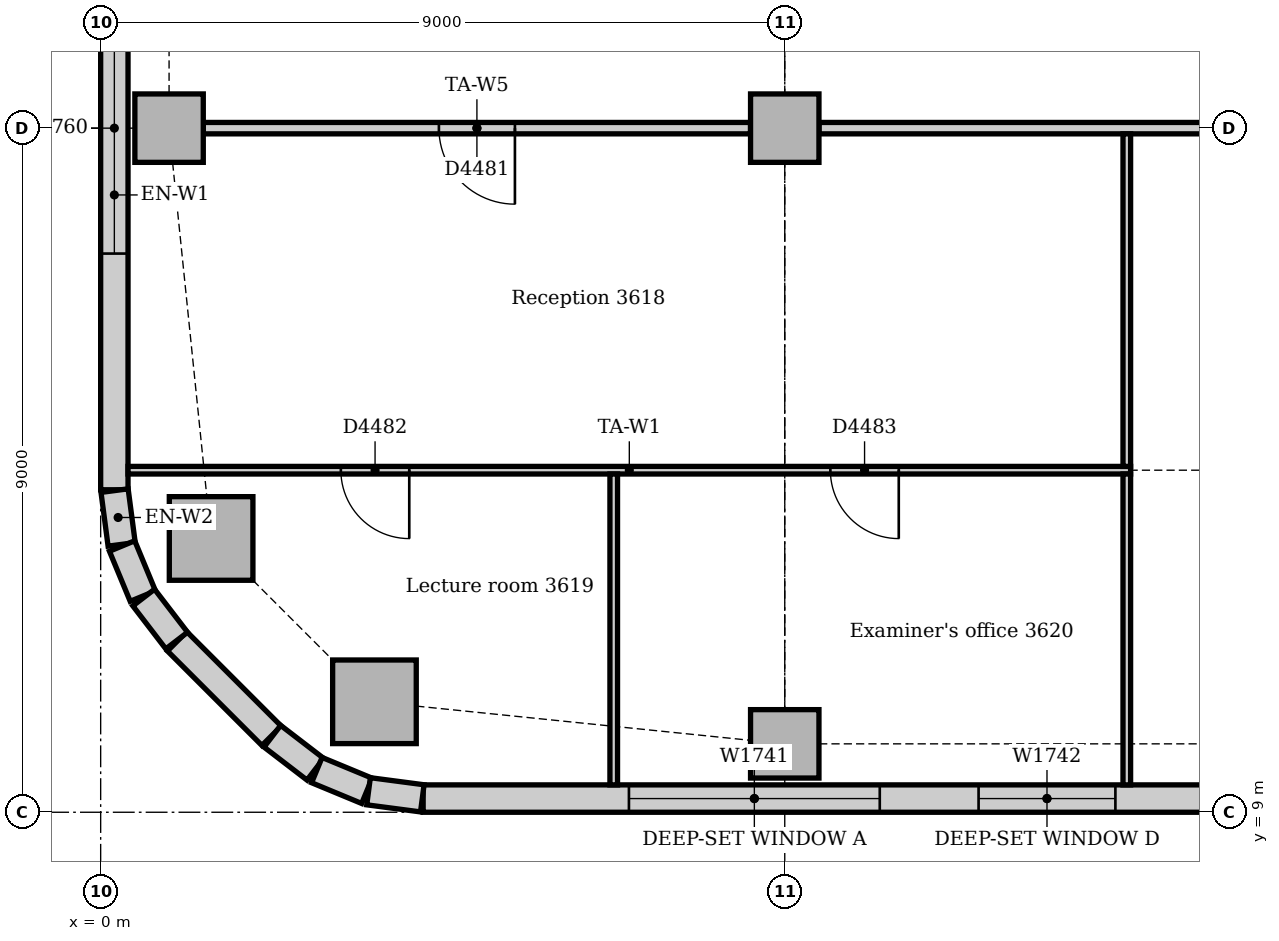
"""IFC4 building model, lengths in metres.
Left out: names, types, materials, properties, quantities, classifications, styles, units other than length and angle.
Written with IfcOpenShell. Run it as: python <this file> out.ifc"""

import sys

from ifc_helpers import new_model, si_unit, direction, frame, frame_2d, origin, origin_2d, place, context, subcontext, project, spatial, rectangle, extrude, element, fill, save


model = new_model("IFC4")
c1 = context("Model", 3, precision=1e-05, world=origin(), true_north=direction((0.0, 1.0)))
c2 = subcontext(c1, "Body", "Model", "MODEL_VIEW")
j1 = project(units=[si_unit("LENGTHUNIT", "METRE"), si_unit("PLANEANGLEUNIT", "RADIAN")], contexts=[c1])
p1 = place(None, origin())
s1 = spatial("IfcSite", under=j1, at=p1, CompositionType="ELEMENT")
p2 = place(p1, origin())
s2 = spatial("IfcBuilding", under=s1, at=p2, CompositionType="ELEMENT")
p3 = place(p2, frame((0.0, 0.0, 153.0)))
s3 = spatial("IfcBuildingStorey", under=s2, at=p3, CompositionType="ELEMENT", Elevation=153.0)
for number, where, z_axis, x_axis in (
    (1, (3.602, 10.453, 0.0), (0.0, 0.0, 1.0), (1.0, 0.0, 0.0)),
    (2, (1.453, 12.602, 0.0), (0.0, 0.0, 1.0), (1.0, 0.0, 0.0)),
):
    element("IfcColumn", number, at=place(p3, frame(where, z_axis=z_axis, x_axis=x_axis)), inside=s3, PredefinedType="COLUMN", context=c2, shape_type="SweptSolid", body=[
        extrude(rectangle(XDim=1.1, YDim=1.1, at=origin_2d()), origin(), (0.0, 0.0, 1.0), 3.85),
    ])
for number, where, z_axis, x_axis in (
    (3, (9.0, 9.9, 0.0), (0.0, 0.0, 1.0), (1.0, 0.0, 0.0)),
    (4, (0.9, 18.0, 0.0), (0.0, 0.0, 1.0), (1.0, 0.0, 0.0)),
    (5, (9.0, 18.0, 0.0), (0.0, 0.0, 1.0), (1.0, 0.0, 0.0)),
):
    element("IfcColumn", number, at=place(p3, frame(where, z_axis=z_axis, x_axis=x_axis)), inside=s3, PredefinedType="COLUMN", context=c2, shape_type="SweptSolid", body=[
        extrude(rectangle(XDim=0.9, YDim=0.9, at=origin_2d()), origin(), (0.0, 0.0, 1.0), 3.85),
    ])
p4 = place(p3, frame((4.243, 9.18, 0.0), z_axis=(0.0, 0.0, 1.0), x_axis=(1.0, 0.0, 0.0)))
e6 = element("IfcWall", 6, at=p4, inside=s3, PredefinedType="STANDARD", context=c2, shape_type="SweptSolid", body=[
    extrude(rectangle(XDim=30.515, YDim=0.36, at=frame_2d((15.257, 0.0))), origin(), (0.0, 0.0, 1.0), 3.85),
])
p5 = place(p4, frame((2.707, 0.0, 0.9)))
e7 = element("IfcOpeningElement", 7, at=p5, cuts=e6, PredefinedType="OPENING", context=c2, shape_type="SweptSolid", body=[
    extrude(rectangle(XDim=3.3, YDim=1.6, at=frame_2d((1.65, 0.8))), frame((0.0, 0.19, 0.0), z_axis=(0.0, -1.0, 0.0), x_axis=(1.0, 0.0, 0.0)), (0.0, 0.0, 1.0), 0.38),
])
p6 = place(p4, frame((7.307, 0.0, 0.9)))
e8 = element("IfcOpeningElement", 8, at=p6, cuts=e6, PredefinedType="OPENING", context=c2, shape_type="SweptSolid", body=[
    extrude(rectangle(XDim=1.8, YDim=1.6, at=frame_2d((0.9, 0.8))), frame((0.0, 0.19, 0.0), z_axis=(0.0, -1.0, 0.0), x_axis=(1.0, 0.0, 0.0)), (0.0, 0.0, 1.0), 0.38),
])
p7 = place(p4, frame((11.357, 0.0, 0.9)))
e9 = element("IfcOpeningElement", 9, at=p7, cuts=e6, PredefinedType="OPENING", context=c2, shape_type="SweptSolid", body=[
    extrude(rectangle(XDim=3.3, YDim=1.6, at=frame_2d((1.65, 0.8))), frame((0.0, 0.19, 0.0), z_axis=(0.0, -1.0, 0.0), x_axis=(1.0, 0.0, 0.0)), (0.0, 0.0, 1.0), 0.38),
])
p8 = place(p4, frame((16.307, 0.0, 0.9)))
e10 = element("IfcOpeningElement", 10, at=p8, cuts=e6, PredefinedType="OPENING", context=c2, shape_type="SweptSolid", body=[
    extrude(rectangle(XDim=1.8, YDim=1.6, at=frame_2d((0.9, 0.8))), frame((0.0, 0.19, 0.0), z_axis=(0.0, -1.0, 0.0), x_axis=(1.0, 0.0, 0.0)), (0.0, 0.0, 1.0), 0.38),
])
p9 = place(p4, frame((20.357, 0.0, 0.9)))
e11 = element("IfcOpeningElement", 11, at=p9, cuts=e6, PredefinedType="OPENING", context=c2, shape_type="SweptSolid", body=[
    extrude(rectangle(XDim=3.3, YDim=1.6, at=frame_2d((1.65, 0.8))), frame((0.0, 0.19, 0.0), z_axis=(0.0, -1.0, 0.0), x_axis=(1.0, 0.0, 0.0)), (0.0, 0.0, 1.0), 0.38),
])
p10 = place(p4, frame((25.207, 0.0, 0.9)))
e12 = element("IfcOpeningElement", 12, at=p10, cuts=e6, PredefinedType="OPENING", context=c2, shape_type="SweptSolid", body=[
    extrude(rectangle(XDim=3.3, YDim=1.6, at=frame_2d((1.65, 0.8))), frame((0.0, 0.19, 0.0), z_axis=(0.0, -1.0, 0.0), x_axis=(1.0, 0.0, 0.0)), (0.0, 0.0, 1.0), 0.38),
])
p11 = place(p3, frame((0.18, 21.0, 0.0), z_axis=(0.0, 0.0, 1.0), x_axis=(0.0, -1.0, 0.0)))
e13 = element("IfcWall", 13, at=p11, inside=s3, PredefinedType="STANDARD", context=c2, shape_type="SweptSolid", body=[
    extrude(rectangle(XDim=7.757, YDim=0.36, at=frame_2d((3.879, 0.0))), origin(), (0.0, 0.0, 1.0), 3.85),
])
p12 = place(p11, frame((1.35, 0.0, 0.9)))
e14 = element("IfcOpeningElement", 14, at=p12, cuts=e13, PredefinedType="OPENING", context=c2, shape_type="SweptSolid", body=[
    extrude(rectangle(XDim=3.3, YDim=1.6, at=frame_2d((1.65, 0.8))), frame((0.0, 0.19, 0.0), z_axis=(0.0, -1.0, 0.0), x_axis=(1.0, 0.0, 0.0)), (0.0, 0.0, 1.0), 0.38),
])
p13 = place(p3, frame((1.006, 11.249, 0.0), z_axis=(0.0, 0.0, 1.0), x_axis=(0.707106781187, -0.707106781187, 0.0)))
e15 = element("IfcWall", 15, at=p13, inside=s3, PredefinedType="STANDARD", context=c2, shape_type="SweptSolid", body=[
    extrude(rectangle(XDim=1.757, YDim=0.36, at=frame_2d((0.879, 0.0))), origin(), (0.0, 0.0, 1.0), 3.85),
])
for number, where, z_axis, x_axis in (
    (16, (0.183, 13.231, 0.0), (0.0, 0.0, 1.0), (0.131, -0.991, 0.0)),
    (17, (0.282, 12.503, 0.0), (0.0, 0.0, 1.0), (0.383, -0.924, 0.0)),
):
    element("IfcWall", number, at=place(p3, frame(where, z_axis=z_axis, x_axis=x_axis)), inside=s3, PredefinedType="STANDARD", context=c2, shape_type="SweptSolid", body=[
        extrude(rectangle(XDim=0.713, YDim=0.36, at=frame_2d((0.356, 0.0))), origin(), (0.0, 0.0, 1.0), 3.85),
    ])
for number, where, z_axis, x_axis in (
    (18, (0.566, 11.825, 0.0), (0.0, 0.0, 1.0), (0.609, -0.793, 0.0)),
    (19, (2.259, 10.0, 0.0), (0.0, 0.0, 1.0), (0.793, -0.609, 0.0)),
):
    element("IfcWall", number, at=place(p3, frame(where, z_axis=z_axis, x_axis=x_axis)), inside=s3, PredefinedType="STANDARD", context=c2, shape_type="SweptSolid", body=[
        extrude(rectangle(XDim=0.713, YDim=0.36, at=frame_2d((0.357, 0.0))), origin(), (0.0, 0.0, 1.0), 3.85),
    ])
for number, where, z_axis, x_axis in (
    (20, (2.844, 9.555, 0.0), (0.0, 0.0, 1.0), (0.924, -0.383, 0.0)),
    (21, (3.524, 9.276, 0.0), (0.0, 0.0, 1.0), (0.991, -0.131, 0.0)),
):
    element("IfcWall", number, at=place(p3, frame(where, z_axis=z_axis, x_axis=x_axis)), inside=s3, PredefinedType="STANDARD", context=c2, shape_type="SweptSolid", body=[
        extrude(rectangle(XDim=0.713, YDim=0.36, at=frame_2d((0.356, 0.0))), origin(), (0.0, 0.0, 1.0), 3.85),
    ])
p14 = place(p3, frame((1.35, 18.0, 0.0), z_axis=(0.0, 0.0, 1.0), x_axis=(1.0, 0.0, 0.0)))
e22 = element("IfcWall", 22, at=p14, inside=s3, PredefinedType="PARTITIONING", context=c2, shape_type="SweptSolid", body=[
    extrude(rectangle(XDim=7.2, YDim=0.15, at=frame_2d((3.6, 0.0))), origin(), (0.0, 0.0, 1.0), 3.262),
])
p15 = place(p14, frame((3.1, 0.0, 0.0)))
e23 = element("IfcOpeningElement", 23, at=p15, cuts=e22, PredefinedType="OPENING", context=c2, shape_type="SweptSolid", body=[
    extrude(rectangle(XDim=1.0, YDim=2.1, at=frame_2d((0.5, 1.05))), frame((0.0, 0.085, 0.0), z_axis=(0.0, -1.0, 0.0), x_axis=(1.0, 0.0, 0.0)), (0.0, 0.0, 1.0), 0.17),
])
p16 = place(p3, frame((9.45, 18.0, 0.0), z_axis=(0.0, 0.0, 1.0), x_axis=(1.0, 0.0, 0.0)))
e24 = element("IfcWall", 24, at=p16, inside=s3, PredefinedType="PARTITIONING", context=c2, shape_type="SweptSolid", body=[
    extrude(rectangle(XDim=8.1, YDim=0.15, at=frame_2d((4.05, 0.0))), origin(), (0.0, 0.0, 1.0), 3.262),
])
p17 = place(p16, frame((5.55, 0.0, 0.0)))
e25 = element("IfcOpeningElement", 25, at=p17, cuts=e24, PredefinedType="OPENING", context=c2, shape_type="SweptSolid", body=[
    extrude(rectangle(XDim=0.9, YDim=2.1, at=frame_2d((0.45, 1.05))), frame((0.0, 0.085, 0.0), z_axis=(0.0, -1.0, 0.0), x_axis=(1.0, 0.0, 0.0)), (0.0, 0.0, 1.0), 0.17),
])
p18 = place(p3, frame((0.36, 13.5, 0.0), z_axis=(0.0, 0.0, 1.0), x_axis=(1.0, 0.0, 0.0)))
e26 = element("IfcWall", 26, at=p18, inside=s3, PredefinedType="PARTITIONING", context=c2, shape_type="SweptSolid", body=[
    extrude(rectangle(XDim=13.19, YDim=0.1, at=frame_2d((6.595, 0.0))), origin(), (0.0, 0.0, 1.0), 3.4),
])
p19 = place(p18, frame((2.8, 0.0, 0.0)))
e27 = element("IfcOpeningElement", 27, at=p19, cuts=e26, PredefinedType="OPENING", context=c2, shape_type="SweptSolid", body=[
    extrude(rectangle(XDim=0.9, YDim=2.1, at=frame_2d((0.45, 1.05))), frame((0.0, 0.06, 0.0), z_axis=(0.0, -1.0, 0.0), x_axis=(1.0, 0.0, 0.0)), (0.0, 0.0, 1.0), 0.12),
])
p20 = place(p18, frame((9.24, 0.0, 0.0)))
e28 = element("IfcOpeningElement", 28, at=p20, cuts=e26, PredefinedType="OPENING", context=c2, shape_type="SweptSolid", body=[
    extrude(rectangle(XDim=0.9, YDim=2.1, at=frame_2d((0.45, 1.05))), frame((0.0, 0.06, 0.0), z_axis=(0.0, -1.0, 0.0), x_axis=(1.0, 0.0, 0.0)), (0.0, 0.0, 1.0), 0.12),
])
p21 = place(p3, frame((13.5, 13.55, 0.0), z_axis=(0.0, 0.0, 1.0), x_axis=(0.0, 1.0, 0.0)))
e29 = element("IfcWall", 29, at=p21, inside=s3, PredefinedType="PARTITIONING", context=c2, shape_type="SweptSolid", body=[
    extrude(rectangle(XDim=4.375, YDim=0.1, at=frame_2d((2.188, 0.0))), origin(), (0.0, 0.0, 1.0), 3.85),
])
for number, where, z_axis, x_axis in (
    (30, (13.5, 9.36, 0.0), (0.0, 0.0, 1.0), (0.0, 1.0, 0.0)),
    (31, (6.75, 9.36, 0.0), (0.0, 0.0, 1.0), (0.0, 1.0, 0.0)),
):
    element("IfcWall", number, at=place(p3, frame(where, z_axis=z_axis, x_axis=x_axis)), inside=s3, PredefinedType="PARTITIONING", context=c2, shape_type="SweptSolid", body=[
        extrude(rectangle(XDim=4.09, YDim=0.1, at=frame_2d((2.045, 0.0))), origin(), (0.0, 0.0, 1.0), 3.85),
    ])
p22 = place(p5, origin())
e32 = element("IfcWindow", 32, at=p22, inside=s3, PartitioningType="SINGLE_PANEL", PredefinedType="WINDOW", context=c2, shape_type="SweptSolid", body=[
    extrude(rectangle(XDim=3.3, YDim=1.6, at=frame_2d((1.65, 0.8))), frame((0.0, 0.13, 0.0), z_axis=(0.0, -1.0, 0.0), x_axis=(1.0, 0.0, 0.0)), (0.0, 0.0, 1.0), 0.06),
])
fill(e7, e32)
p23 = place(p6, origin())
e33 = element("IfcWindow", 33, at=p23, inside=s3, PartitioningType="SINGLE_PANEL", PredefinedType="WINDOW", context=c2, shape_type="SweptSolid", body=[
    extrude(rectangle(XDim=1.8, YDim=1.6, at=frame_2d((0.9, 0.8))), frame((0.0, 0.13, 0.0), z_axis=(0.0, -1.0, 0.0), x_axis=(1.0, 0.0, 0.0)), (0.0, 0.0, 1.0), 0.06),
])
fill(e8, e33)
p24 = place(p12, origin())
e34 = element("IfcWindow", 34, at=p24, inside=s3, PartitioningType="SINGLE_PANEL", PredefinedType="WINDOW", context=c2, shape_type="SweptSolid", body=[
    extrude(rectangle(XDim=3.3, YDim=1.6, at=frame_2d((1.65, 0.8))), frame((0.0, 0.13, 0.0), z_axis=(0.0, -1.0, 0.0), x_axis=(1.0, 0.0, 0.0)), (0.0, 0.0, 1.0), 0.06),
])
fill(e14, e34)
p25 = place(p15, frame((1.0, 0.0, 0.0), z_axis=(0.0, 0.0, 1.0), x_axis=(-1.0, 0.0, 0.0)))
e35 = element("IfcDoor", 35, at=p25, inside=s3, OperationType="SINGLE_SWING_LEFT", PredefinedType="DOOR", context=c2, shape_type="SweptSolid", body=[
    extrude(rectangle(XDim=1.0, YDim=2.1, at=frame_2d((0.5, 1.05))), frame((0.0, 0.025, 0.0), z_axis=(0.0, -1.0, 0.0), x_axis=(1.0, 0.0, 0.0)), (0.0, 0.0, 1.0), 0.05),
])
fill(e23, e35)
p26 = place(p19, frame((0.9, 0.0, 0.0), z_axis=(0.0, 0.0, 1.0), x_axis=(-1.0, 0.0, 0.0)))
e36 = element("IfcDoor", 36, at=p26, inside=s3, OperationType="SINGLE_SWING_LEFT", PredefinedType="DOOR", context=c2, shape_type="SweptSolid", body=[
    extrude(rectangle(XDim=0.9, YDim=2.1, at=frame_2d((0.45, 1.05))), frame((0.0, 0.025, 0.0), z_axis=(0.0, -1.0, 0.0), x_axis=(1.0, 0.0, 0.0)), (0.0, 0.0, 1.0), 0.05),
])
fill(e27, e36)
p27 = place(p20, frame((0.9, 0.0, 0.0), z_axis=(0.0, 0.0, 1.0), x_axis=(-1.0, 0.0, 0.0)))
e37 = element("IfcDoor", 37, at=p27, inside=s3, OperationType="SINGLE_SWING_LEFT", PredefinedType="DOOR", context=c2, shape_type="SweptSolid", body=[
    extrude(rectangle(XDim=0.9, YDim=2.1, at=frame_2d((0.45, 1.05))), frame((0.0, 0.025, 0.0), z_axis=(0.0, -1.0, 0.0), x_axis=(1.0, 0.0, 0.0)), (0.0, 0.0, 1.0), 0.05),
])
fill(e28, e37)
save(model, sys.argv[1])
